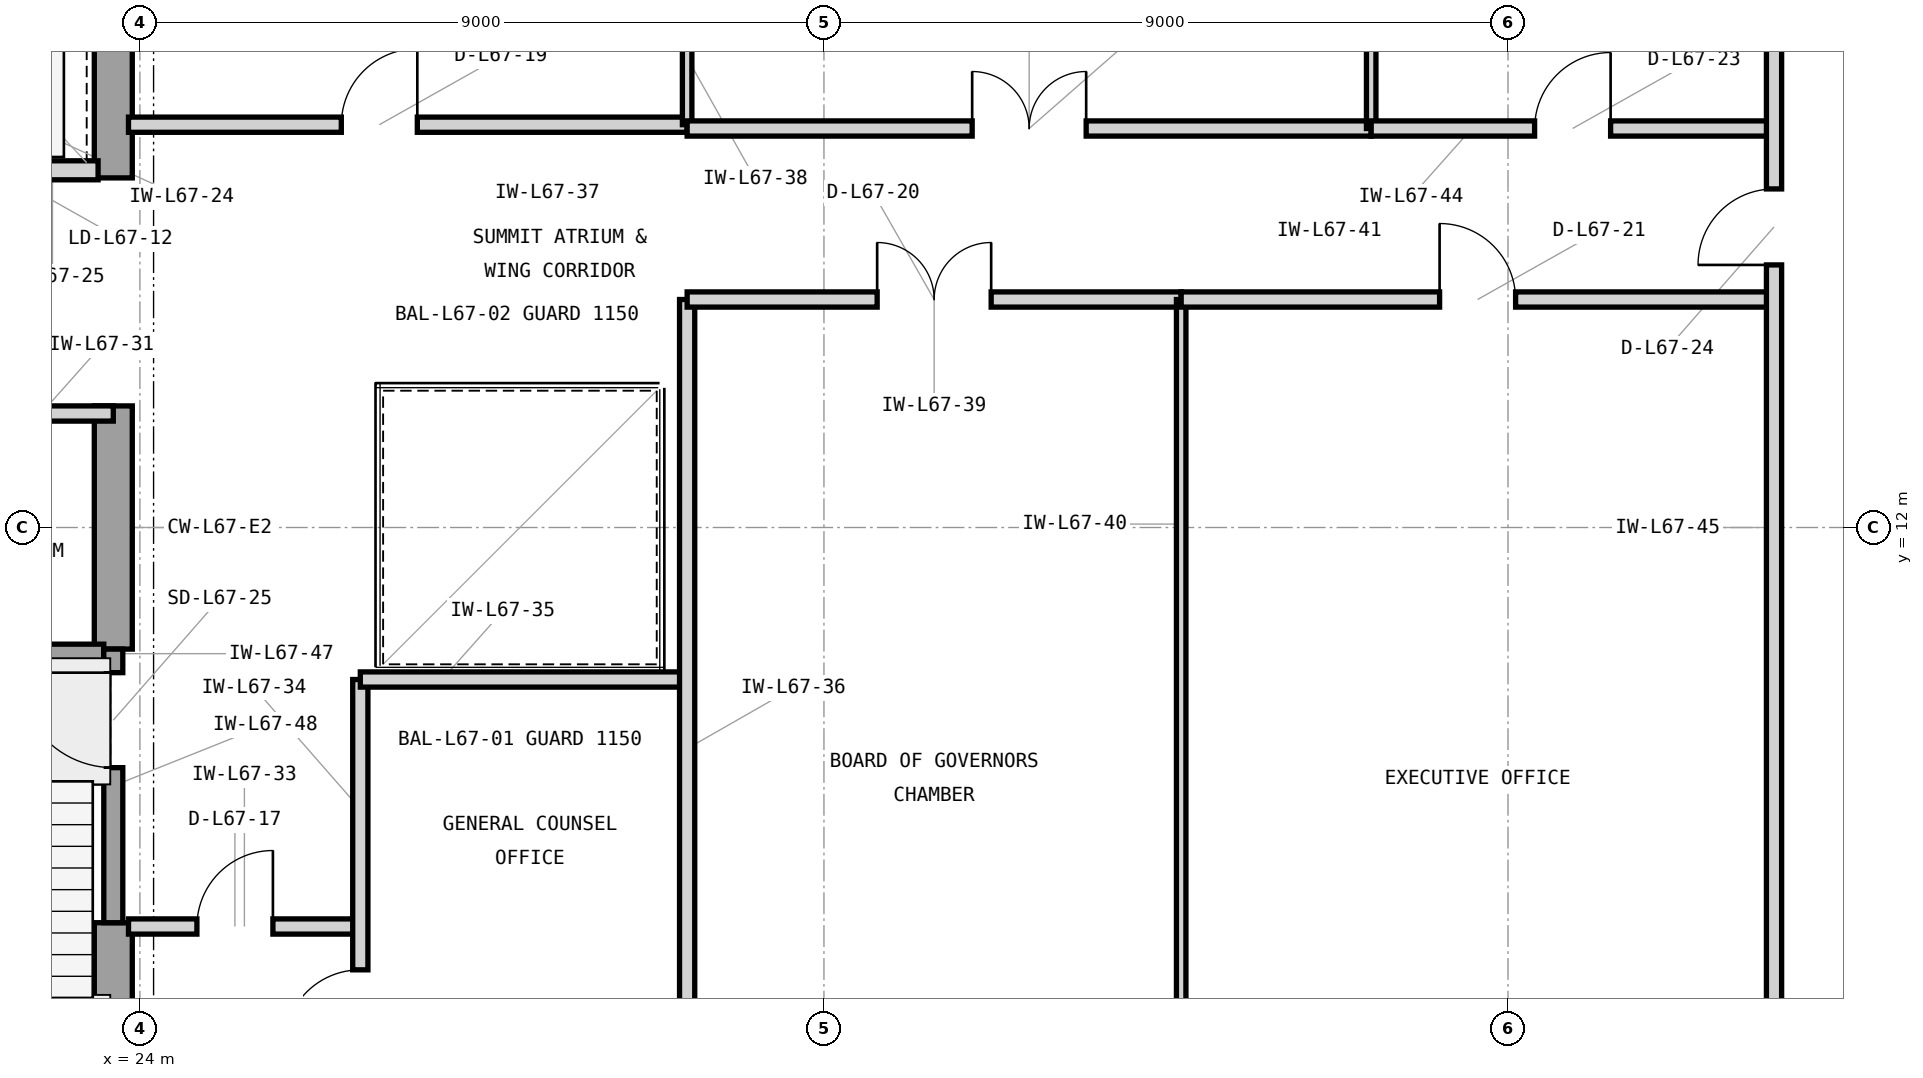
"""IFC4 building model, lengths in metres.
Left out: names, types, materials, properties, quantities, classifications, styles, units other than length and angle.
Written with IfcOpenShell. Run it as: python <this file> out.ifc"""

import sys

from ifc_helpers import new_model, si_unit, direction, frame, frame_2d, origin, place, context, subcontext, project, spatial, rectangle, extrude, element, fill, save


model = new_model("IFC4")
c1 = context("Model", 3, precision=1e-05, world=origin(), true_north=direction((0.0, 1.0)))
c2 = subcontext(c1, "Body", "Model", "MODEL_VIEW")
j1 = project(units=[si_unit("LENGTHUNIT", "METRE"), si_unit("PLANEANGLEUNIT", "RADIAN")], contexts=[c1])
p1 = place(None, origin())
s1 = spatial("IfcSite", under=j1, at=p1, CompositionType="ELEMENT")
p2 = place(p1, origin())
s2 = spatial("IfcBuilding", under=s1, at=p2, CompositionType="ELEMENT")
p3 = place(p2, frame((0.0, 0.0, 274.2)))
s3 = spatial("IfcBuildingStorey", under=s2, at=p3, CompositionType="ELEMENT", Elevation=274.2)
p4 = place(p3, frame((23.65, 3.6, 0.0), z_axis=(0.0, 0.0, 1.0), x_axis=(0.0, 1.0, 0.0)))
e1 = element("IfcWall", 1, at=p4, inside=s3, PredefinedType="SHEAR", context=c2, shape_type="SweptSolid", body=[
    extrude(rectangle(XDim=3.2, YDim=0.5, at=frame_2d((1.6, 0.0))), origin(), (0.0, 0.0, 1.0), 3.9),
])
p5 = place(p3, frame((23.65, 10.4, 0.0), z_axis=(0.0, 0.0, 1.0), x_axis=(0.0, 1.0, 0.0)))
e2 = element("IfcWall", 2, at=p5, inside=s3, PredefinedType="SHEAR", context=c2, shape_type="SweptSolid", body=[
    extrude(rectangle(XDim=3.2, YDim=0.5, at=frame_2d((1.6, 0.0))), origin(), (0.0, 0.0, 1.0), 3.9),
])
p6 = place(p3, frame((23.65, 16.6, 0.0), z_axis=(0.0, 0.0, 1.0), x_axis=(0.0, 1.0, 0.0)))
e3 = element("IfcWall", 3, at=p6, inside=s3, PredefinedType="SHEAR", context=c2, shape_type="SweptSolid", body=[
    extrude(rectangle(XDim=4.05, YDim=0.5, at=frame_2d((2.025, 0.0))), origin(), (0.0, 0.0, 1.0), 3.9),
])
p7 = place(p3, frame((21.05, 16.7, 0.0), z_axis=(0.0, 0.0, 1.0), x_axis=(1.0, 0.0, 0.0)))
e4 = element("IfcWall", 4, at=p7, inside=s3, PredefinedType="PARTITIONING", context=c2, shape_type="SweptSolid", body=[
    extrude(rectangle(XDim=2.4, YDim=0.25, at=frame_2d((1.2, 0.0))), origin(), (0.0, 0.0, 1.0), 3.088),
])
p8 = place(p7, frame((0.52, 0.0, 0.0)))
e5 = element("IfcOpeningElement", 5, at=p8, cuts=e4, PredefinedType="OPENING", context=c2, shape_type="SweptSolid", body=[
    extrude(rectangle(XDim=1.15, YDim=2.25, at=frame_2d((0.575, 1.125))), frame((0.0, 0.135, 0.0), z_axis=(0.0, -1.0, 0.0), x_axis=(1.0, 0.0, 0.0)), (0.0, 0.0, 1.0), 0.27),
])
p9 = place(p3, frame((19.85, 13.5, 0.0), z_axis=(0.0, 0.0, 1.0), x_axis=(1.0, 0.0, 0.0)))
e6 = element("IfcWall", 6, at=p9, inside=s3, PredefinedType="PARTITIONING", context=c2, shape_type="SweptSolid", body=[
    extrude(rectangle(XDim=3.8, YDim=0.2, at=frame_2d((1.9, 0.0))), origin(), (0.0, 0.0, 1.0), 3.088),
])
p10 = place(p9, frame((1.425, 0.0, 0.0)))
e7 = element("IfcOpeningElement", 7, at=p10, cuts=e6, PredefinedType="OPENING", context=c2, shape_type="SweptSolid", body=[
    extrude(rectangle(XDim=0.95, YDim=2.1, at=frame_2d((0.475, 1.05))), frame((0.0, 0.11, 0.0), z_axis=(0.0, -1.0, 0.0), x_axis=(1.0, 0.0, 0.0)), (0.0, 0.0, 1.0), 0.22),
])
p11 = place(p3, frame((23.85, 6.75, 0.0), z_axis=(0.0, 0.0, 1.0), x_axis=(1.0, 0.0, 0.0)))
e8 = element("IfcWall", 8, at=p11, inside=s3, PredefinedType="PARTITIONING", context=c2, shape_type="SweptSolid", body=[
    extrude(rectangle(XDim=3.05, YDim=0.2, at=frame_2d((1.525, 0.0))), origin(), (0.0, 0.0, 1.0), 3.705),
])
p12 = place(p11, frame((0.9, 0.0, 0.0)))
e9 = element("IfcOpeningElement", 9, at=p12, cuts=e8, PredefinedType="OPENING", context=c2, shape_type="SweptSolid", body=[
    extrude(rectangle(XDim=1.0, YDim=2.15, at=frame_2d((0.5, 1.075))), frame((0.0, 0.11, 0.0), z_axis=(0.0, -1.0, 0.0), x_axis=(1.0, 0.0, 0.0)), (0.0, 0.0, 1.0), 0.22),
])
p13 = place(p3, frame((26.9, 3.18, 0.0), z_axis=(0.0, 0.0, 1.0), x_axis=(0.0, 1.0, 0.0)))
e10 = element("IfcWall", 10, at=p13, inside=s3, PredefinedType="PARTITIONING", context=c2, shape_type="SweptSolid", body=[
    extrude(rectangle(XDim=6.82, YDim=0.2, at=frame_2d((3.41, 0.0))), origin(), (0.0, 0.0, 1.0), 3.705),
])
p14 = place(p13, frame((2.0, 0.0, 0.0)))
e11 = element("IfcOpeningElement", 11, at=p14, cuts=e10, PredefinedType="OPENING", context=c2, shape_type="SweptSolid", body=[
    extrude(rectangle(XDim=1.0, YDim=2.15, at=frame_2d((0.5, 1.075))), frame((0.0, 0.11, 0.0), z_axis=(0.0, -1.0, 0.0), x_axis=(1.0, 0.0, 0.0)), (0.0, 0.0, 1.0), 0.22),
])
p15 = place(p3, frame((26.9, 10.0, 0.0), z_axis=(0.0, 0.0, 1.0), x_axis=(1.0, 0.0, 0.0)))
e12 = element("IfcWall", 12, at=p15, inside=s3, PredefinedType="PARTITIONING", context=c2, shape_type="SweptSolid", body=[
    extrude(rectangle(XDim=4.3, YDim=0.2, at=frame_2d((2.15, 0.0))), origin(), (0.0, 0.0, 1.0), 3.705),
])
p16 = place(p3, frame((31.2, 3.18, 0.0), z_axis=(0.0, 0.0, 1.0), x_axis=(0.0, 1.0, 0.0)))
e13 = element("IfcWall", 13, at=p16, inside=s3, PredefinedType="PARTITIONING", context=c2, shape_type="SweptSolid", body=[
    extrude(rectangle(XDim=11.82, YDim=0.2, at=frame_2d((5.91, 0.0))), origin(), (0.0, 0.0, 1.0), 3.705),
])
p17 = place(p3, frame((23.85, 17.3, 0.0), z_axis=(0.0, 0.0, 1.0), x_axis=(1.0, 0.0, 0.0)))
e14 = element("IfcWall", 14, at=p17, inside=s3, PredefinedType="PARTITIONING", context=c2, shape_type="SweptSolid", body=[
    extrude(rectangle(XDim=7.35, YDim=0.2, at=frame_2d((3.675, 0.0))), origin(), (0.0, 0.0, 1.0), 3.705),
])
p18 = place(p17, frame((2.8, 0.0, 0.0)))
e15 = element("IfcOpeningElement", 15, at=p18, cuts=e14, PredefinedType="OPENING", context=c2, shape_type="SweptSolid", body=[
    extrude(rectangle(XDim=1.0, YDim=2.15, at=frame_2d((0.5, 1.075))), frame((0.0, 0.11, 0.0), z_axis=(0.0, -1.0, 0.0), x_axis=(1.0, 0.0, 0.0)), (0.0, 0.0, 1.0), 0.22),
])
p19 = place(p3, frame((31.2, 17.3, 0.0), z_axis=(0.0, 0.0, 1.0), x_axis=(0.0, 1.0, 0.0)))
e16 = element("IfcWall", 16, at=p19, inside=s3, PredefinedType="PARTITIONING", context=c2, shape_type="SweptSolid", body=[
    extrude(rectangle(XDim=3.52, YDim=0.125, at=frame_2d((1.76, 0.0))), origin(), (0.0, 0.0, 1.0), 3.705),
])
p20 = place(p3, frame((31.2, 15.0, 0.0), z_axis=(0.0, 0.0, 1.0), x_axis=(1.0, 0.0, 0.0)))
e17 = element("IfcWall", 17, at=p20, inside=s3, PredefinedType="PARTITIONING", context=c2, shape_type="SweptSolid", body=[
    extrude(rectangle(XDim=6.5, YDim=0.2, at=frame_2d((3.25, 0.0))), origin(), (0.0, 0.0, 1.0), 3.301),
])
p21 = place(p20, frame((2.5, 0.0, 0.0)))
e18 = element("IfcOpeningElement", 18, at=p21, cuts=e17, PredefinedType="OPENING", context=c2, shape_type="SweptSolid", body=[
    extrude(rectangle(XDim=1.5, YDim=2.3, at=frame_2d((0.75, 1.15))), frame((0.0, 0.11, 0.0), z_axis=(0.0, -1.0, 0.0), x_axis=(1.0, 0.0, 0.0)), (0.0, 0.0, 1.0), 0.22),
])
p22 = place(p3, frame((37.7, 3.18, 0.0), z_axis=(0.0, 0.0, 1.0), x_axis=(0.0, 1.0, 0.0)))
e19 = element("IfcWall", 19, at=p22, inside=s3, PredefinedType="PARTITIONING", context=c2, shape_type="SweptSolid", body=[
    extrude(rectangle(XDim=11.82, YDim=0.125, at=frame_2d((5.91, 0.0))), origin(), (0.0, 0.0, 1.0), 3.705),
])
p23 = place(p3, frame((37.7, 15.0, 0.0), z_axis=(0.0, 0.0, 1.0), x_axis=(1.0, 0.0, 0.0)))
e20 = element("IfcWall", 20, at=p23, inside=s3, PredefinedType="PARTITIONING", context=c2, shape_type="SweptSolid", body=[
    extrude(rectangle(XDim=7.8, YDim=0.2, at=frame_2d((3.9, 0.0))), origin(), (0.0, 0.0, 1.0), 3.301),
])
p24 = place(p23, frame((3.4, 0.0, 0.0)))
e21 = element("IfcOpeningElement", 21, at=p24, cuts=e20, PredefinedType="OPENING", context=c2, shape_type="SweptSolid", body=[
    extrude(rectangle(XDim=1.0, YDim=2.15, at=frame_2d((0.5, 1.075))), frame((0.0, 0.11, 0.0), z_axis=(0.0, -1.0, 0.0), x_axis=(1.0, 0.0, 0.0)), (0.0, 0.0, 1.0), 0.22),
])
p25 = place(p3, frame((31.2, 17.25, 0.0), z_axis=(0.0, 0.0, 1.0), x_axis=(1.0, 0.0, 0.0)))
e22 = element("IfcWall", 22, at=p25, inside=s3, PredefinedType="PARTITIONING", context=c2, shape_type="SweptSolid", body=[
    extrude(rectangle(XDim=9.0, YDim=0.2, at=frame_2d((4.5, 0.0))), origin(), (0.0, 0.0, 1.0), 3.705),
])
p26 = place(p25, frame((3.75, 0.0, 0.0)))
e23 = element("IfcOpeningElement", 23, at=p26, cuts=e22, PredefinedType="OPENING", context=c2, shape_type="SweptSolid", body=[
    extrude(rectangle(XDim=1.5, YDim=2.3, at=frame_2d((0.75, 1.15))), frame((0.0, 0.11, 0.0), z_axis=(0.0, -1.0, 0.0), x_axis=(1.0, 0.0, 0.0)), (0.0, 0.0, 1.0), 0.22),
])
p27 = place(p3, frame((40.2, 17.25, 0.0), z_axis=(0.0, 0.0, 1.0), x_axis=(0.0, 1.0, 0.0)))
e24 = element("IfcWall", 24, at=p27, inside=s3, PredefinedType="PARTITIONING", context=c2, shape_type="SweptSolid", body=[
    extrude(rectangle(XDim=3.57, YDim=0.125, at=frame_2d((1.785, 0.0))), origin(), (0.0, 0.0, 1.0), 3.705),
])
p28 = place(p3, frame((40.2, 17.25, 0.0), z_axis=(0.0, 0.0, 1.0), x_axis=(1.0, 0.0, 0.0)))
e25 = element("IfcWall", 25, at=p28, inside=s3, PredefinedType="PARTITIONING", context=c2, shape_type="SweptSolid", body=[
    extrude(rectangle(XDim=5.3, YDim=0.2, at=frame_2d((2.65, 0.0))), origin(), (0.0, 0.0, 1.0), 3.705),
])
p29 = place(p28, frame((2.15, 0.0, 0.0)))
e26 = element("IfcOpeningElement", 26, at=p29, cuts=e25, PredefinedType="OPENING", context=c2, shape_type="SweptSolid", body=[
    extrude(rectangle(XDim=1.0, YDim=2.15, at=frame_2d((0.5, 1.075))), frame((0.0, 0.11, 0.0), z_axis=(0.0, -1.0, 0.0), x_axis=(1.0, 0.0, 0.0)), (0.0, 0.0, 1.0), 0.22),
])
p30 = place(p3, frame((45.5, 3.18, 0.0), z_axis=(0.0, 0.0, 1.0), x_axis=(0.0, 1.0, 0.0)))
e27 = element("IfcWall", 27, at=p30, inside=s3, PredefinedType="PARTITIONING", context=c2, shape_type="SweptSolid", body=[
    extrude(rectangle(XDim=17.64, YDim=0.2, at=frame_2d((8.82, 0.0))), origin(), (0.0, 0.0, 1.0), 3.705),
])
p31 = place(p30, frame((12.275, 0.0, 0.0)))
e28 = element("IfcOpeningElement", 28, at=p31, cuts=e27, PredefinedType="OPENING", context=c2, shape_type="SweptSolid", body=[
    extrude(rectangle(XDim=1.0, YDim=2.15, at=frame_2d((0.5, 1.075))), frame((0.0, 0.11, 0.0), z_axis=(0.0, -1.0, 0.0), x_axis=(1.0, 0.0, 0.0)), (0.0, 0.0, 1.0), 0.22),
])
p32 = place(p3, frame((19.705, 10.34, 0.0), z_axis=(0.0, 0.0, 1.0), x_axis=(1.0, 0.0, 0.0)))
e29 = element("IfcWall", 29, at=p32, inside=s3, PredefinedType="SHEAR", context=c2, shape_type="SweptSolid", body=[
    extrude(rectangle(XDim=3.82, YDim=0.25, at=frame_2d((1.91, 0.0))), origin(), (0.0, 0.0, 1.0), 3.9),
])
p33 = place(p3, frame((23.65, 6.8, 0.0), z_axis=(0.0, 0.0, 1.0), x_axis=(0.0, 1.0, 0.0)))
e30 = element("IfcWall", 30, at=p33, inside=s3, PredefinedType="SHEAR", context=c2, shape_type="SweptSolid", body=[
    extrude(rectangle(XDim=3.6, YDim=0.25, at=frame_2d((1.8, 0.0))), origin(), (0.0, 0.0, 1.0), 3.9),
])
p34 = place(p33, frame((2.04, 0.0, 0.0)))
e31 = element("IfcOpeningElement", 31, at=p34, cuts=e30, PredefinedType="OPENING", context=c2, shape_type="SweptSolid", body=[
    extrude(rectangle(XDim=1.25, YDim=2.2, at=frame_2d((0.625, 1.1))), frame((0.0, 0.135, 0.0), z_axis=(0.0, -1.0, 0.0), x_axis=(1.0, 0.0, 0.0)), (0.0, 0.0, 1.0), 0.27),
])
p35 = place(p12, origin())
e32 = element("IfcDoor", 32, at=p35, inside=s3, OperationType="SINGLE_SWING_RIGHT", PredefinedType="DOOR", context=c2, shape_type="SweptSolid", body=[
    extrude(rectangle(XDim=1.0, YDim=2.15, at=frame_2d((0.5, 1.075))), frame((0.0, 0.025, 0.0), z_axis=(0.0, -1.0, 0.0), x_axis=(1.0, 0.0, 0.0)), (0.0, 0.0, 1.0), 0.05),
])
fill(e9, e32)
p36 = place(p14, origin())
e33 = element("IfcDoor", 33, at=p36, inside=s3, OperationType="SINGLE_SWING_LEFT", PredefinedType="DOOR", context=c2, shape_type="SweptSolid", body=[
    extrude(rectangle(XDim=1.0, YDim=2.15, at=frame_2d((0.5, 1.075))), frame((0.0, 0.025, 0.0), z_axis=(0.0, -1.0, 0.0), x_axis=(1.0, 0.0, 0.0)), (0.0, 0.0, 1.0), 0.05),
])
fill(e11, e33)
p37 = place(p18, origin())
e34 = element("IfcDoor", 34, at=p37, inside=s3, OperationType="SINGLE_SWING_RIGHT", PredefinedType="DOOR", context=c2, shape_type="SweptSolid", body=[
    extrude(rectangle(XDim=1.0, YDim=2.15, at=frame_2d((0.5, 1.075))), frame((0.0, 0.025, 0.0), z_axis=(0.0, -1.0, 0.0), x_axis=(1.0, 0.0, 0.0)), (0.0, 0.0, 1.0), 0.05),
])
fill(e15, e34)
p38 = place(p21, origin())
e35 = element("IfcDoor", 35, at=p38, inside=s3, OperationType="DOUBLE_DOOR_SINGLE_SWING", PredefinedType="DOOR", context=c2, shape_type="SweptSolid", body=[
    extrude(rectangle(XDim=1.5, YDim=2.3, at=frame_2d((0.75, 1.15))), frame((0.0, 0.025, 0.0), z_axis=(0.0, -1.0, 0.0), x_axis=(1.0, 0.0, 0.0)), (0.0, 0.0, 1.0), 0.05),
])
fill(e18, e35)
p39 = place(p24, origin())
e36 = element("IfcDoor", 36, at=p39, inside=s3, OperationType="SINGLE_SWING_LEFT", PredefinedType="DOOR", context=c2, shape_type="SweptSolid", body=[
    extrude(rectangle(XDim=1.0, YDim=2.15, at=frame_2d((0.5, 1.075))), frame((0.0, 0.025, 0.0), z_axis=(0.0, -1.0, 0.0), x_axis=(1.0, 0.0, 0.0)), (0.0, 0.0, 1.0), 0.05),
])
fill(e21, e36)
p40 = place(p26, origin())
e37 = element("IfcDoor", 37, at=p40, inside=s3, OperationType="DOUBLE_DOOR_SINGLE_SWING", PredefinedType="DOOR", context=c2, shape_type="SweptSolid", body=[
    extrude(rectangle(XDim=1.5, YDim=2.3, at=frame_2d((0.75, 1.15))), frame((0.0, 0.025, 0.0), z_axis=(0.0, -1.0, 0.0), x_axis=(1.0, 0.0, 0.0)), (0.0, 0.0, 1.0), 0.05),
])
fill(e23, e37)
p41 = place(p29, origin())
e38 = element("IfcDoor", 38, at=p41, inside=s3, OperationType="SINGLE_SWING_RIGHT", PredefinedType="DOOR", context=c2, shape_type="SweptSolid", body=[
    extrude(rectangle(XDim=1.0, YDim=2.15, at=frame_2d((0.5, 1.075))), frame((0.0, 0.025, 0.0), z_axis=(0.0, -1.0, 0.0), x_axis=(1.0, 0.0, 0.0)), (0.0, 0.0, 1.0), 0.05),
])
fill(e26, e38)
p42 = place(p31, origin())
e39 = element("IfcDoor", 39, at=p42, inside=s3, OperationType="SINGLE_SWING_LEFT", PredefinedType="DOOR", context=c2, shape_type="SweptSolid", body=[
    extrude(rectangle(XDim=1.0, YDim=2.15, at=frame_2d((0.5, 1.075))), frame((0.0, 0.025, 0.0), z_axis=(0.0, -1.0, 0.0), x_axis=(1.0, 0.0, 0.0)), (0.0, 0.0, 1.0), 0.05),
])
fill(e28, e39)
p43 = place(p34, origin())
e40 = element("IfcDoor", 40, at=p43, inside=s3, OperationType="SINGLE_SWING_RIGHT", PredefinedType="DOOR", context=c2, shape_type="SweptSolid", body=[
    extrude(rectangle(XDim=1.25, YDim=2.2, at=frame_2d((0.625, 1.1))), frame((0.0, 0.025, 0.0), z_axis=(0.0, -1.0, 0.0), x_axis=(1.0, 0.0, 0.0)), (0.0, 0.0, 1.0), 0.05),
])
fill(e31, e40)
save(model, sys.argv[1])
